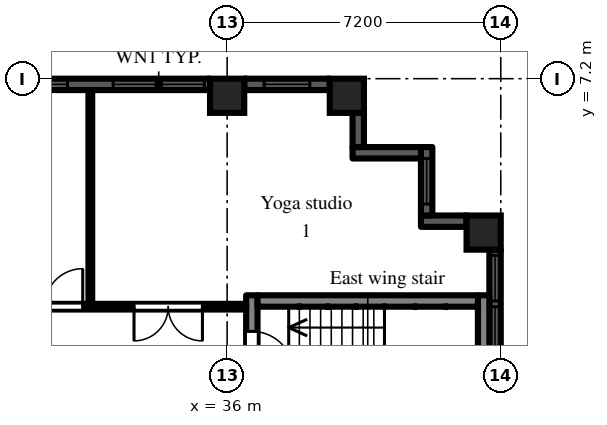
"""IFC4 building model, lengths in metres.
Left out: names, types, materials, properties, quantities, classifications, styles, units other than length and angle.
Written with IfcOpenShell. Run it as: python <this file> out.ifc"""

import sys

from ifc_helpers import new_model, si_unit, direction, frame, frame_2d, origin, origin_2d, place, context, subcontext, project, spatial, rectangle, extrude, element, fill, save


model = new_model("IFC4")
c1 = context("Model", 3, precision=1e-05, world=origin(), true_north=direction((0.0, 1.0)))
c2 = subcontext(c1, "Body", "Model", "MODEL_VIEW")
j1 = project(units=[si_unit("LENGTHUNIT", "METRE"), si_unit("PLANEANGLEUNIT", "RADIAN")], contexts=[c1])
p1 = place(None, origin())
s1 = spatial("IfcSite", under=j1, at=p1, CompositionType="ELEMENT")
p2 = place(p1, origin())
s2 = spatial("IfcBuilding", under=s1, at=p2, CompositionType="ELEMENT")
p3 = place(p2, frame((0.0, 0.0, 84.9)))
s3 = spatial("IfcBuildingStorey", under=s2, at=p3, CompositionType="ELEMENT", Elevation=84.9)
for number, where, z_axis, x_axis in (
    (1, (36.0, 6.75, 0.0), (0.0, 0.0, 1.0), (1.0, 0.0, 0.0)),
    (2, (39.15, 6.75, 0.0), (0.0, 0.0, 1.0), (1.0, 0.0, 0.0)),
    (3, (42.75, 3.15, 0.0), (0.0, 0.0, 1.0), (1.0, 0.0, 0.0)),
):
    element("IfcColumn", number, at=place(p3, frame(where, z_axis=z_axis, x_axis=x_axis)), inside=s3, PredefinedType="COLUMN", context=c2, shape_type="SweptSolid", body=[
        extrude(rectangle(XDim=0.9, YDim=0.9, at=origin_2d()), origin(), (0.0, 0.0, 1.0), 3.0),
    ])
p4 = place(p3, frame((43.05, -2.7, 0.0), z_axis=(0.0, 0.0, 1.0), x_axis=(0.0, 1.0, 0.0)))
e4 = element("IfcWall", 4, at=p4, inside=s3, PredefinedType="SOLIDWALL", context=c2, shape_type="SweptSolid", body=[
    extrude(rectangle(XDim=5.4, YDim=0.3, at=frame_2d((2.7, 0.0))), origin(), (0.0, 0.0, 1.0), 2.1),
])
p5 = place(p4, frame((1.5, 0.0, 0.2)))
e5 = element("IfcOpeningElement", 5, at=p5, cuts=e4, PredefinedType="OPENING", context=c2, shape_type="SweptSolid", body=[
    extrude(rectangle(XDim=2.4, YDim=1.85, at=frame_2d((1.2, 0.925))), frame((0.0, 0.16, 0.0), z_axis=(0.0, -1.0, 0.0), x_axis=(1.0, 0.0, 0.0)), (0.0, 0.0, 1.0), 0.32),
])
p6 = place(p4, frame((0.15, 0.0, 0.2)))
e6 = element("IfcOpeningElement", 6, at=p6, cuts=e4, PredefinedType="OPENING", context=c2, shape_type="SweptSolid", body=[
    extrude(rectangle(XDim=1.2, YDim=1.85, at=frame_2d((0.6, 0.925))), frame((0.0, 0.16, 0.0), z_axis=(0.0, -1.0, 0.0), x_axis=(1.0, 0.0, 0.0)), (0.0, 0.0, 1.0), 0.32),
])
p7 = place(p4, frame((4.05, 0.0, 0.2)))
e7 = element("IfcOpeningElement", 7, at=p7, cuts=e4, PredefinedType="OPENING", context=c2, shape_type="SweptSolid", body=[
    extrude(rectangle(XDim=1.2, YDim=1.85, at=frame_2d((0.6, 0.925))), frame((0.0, 0.16, 0.0), z_axis=(0.0, -1.0, 0.0), x_axis=(1.0, 0.0, 0.0)), (0.0, 0.0, 1.0), 0.32),
])
p8 = place(p3, frame((42.3, 3.45, 0.0), z_axis=(0.0, 0.0, 1.0), x_axis=(-1.0, 0.0, 0.0)))
e8 = element("IfcWall", 8, at=p8, inside=s3, PredefinedType="SOLIDWALL", context=c2, shape_type="SweptSolid", body=[
    extrude(rectangle(XDim=1.2, YDim=0.3, at=frame_2d((0.6, 0.0))), origin(), (0.0, 0.0, 1.0), 2.575),
])
p9 = place(p3, frame((41.25, 3.6, 0.0), z_axis=(0.0, 0.0, 1.0), x_axis=(0.0, 1.0, 0.0)))
e9 = element("IfcWall", 9, at=p9, inside=s3, PredefinedType="SOLIDWALL", context=c2, shape_type="SweptSolid", body=[
    extrude(rectangle(XDim=1.8, YDim=0.3, at=frame_2d((0.9, 0.0))), origin(), (0.0, 0.0, 1.0), 2.575),
])
p10 = place(p9, frame((0.3, 0.0, 0.2)))
e10 = element("IfcOpeningElement", 10, at=p10, cuts=e9, PredefinedType="OPENING", context=c2, shape_type="SweptSolid", body=[
    extrude(rectangle(XDim=1.2, YDim=1.85, at=frame_2d((0.6, 0.925))), frame((0.0, 0.16, 0.0), z_axis=(0.0, -1.0, 0.0), x_axis=(1.0, 0.0, 0.0)), (0.0, 0.0, 1.0), 0.32),
])
p11 = place(p3, frame((41.1, 5.25, 0.0), z_axis=(0.0, 0.0, 1.0), x_axis=(-1.0, 0.0, 0.0)))
e11 = element("IfcWall", 11, at=p11, inside=s3, PredefinedType="SOLIDWALL", context=c2, shape_type="SweptSolid", body=[
    extrude(rectangle(XDim=1.8, YDim=0.3, at=frame_2d((0.9, 0.0))), origin(), (0.0, 0.0, 1.0), 2.575),
])
p12 = place(p3, frame((39.45, 5.4, 0.0), z_axis=(0.0, 0.0, 1.0), x_axis=(0.0, 1.0, 0.0)))
e12 = element("IfcWall", 12, at=p12, inside=s3, PredefinedType="SOLIDWALL", context=c2, shape_type="SweptSolid", body=[
    extrude(rectangle(XDim=0.9, YDim=0.3, at=frame_2d((0.45, 0.0))), origin(), (0.0, 0.0, 1.0), 2.575),
])
p13 = place(p3, frame((38.7, 7.05, 0.0), z_axis=(0.0, 0.0, 1.0), x_axis=(-1.0, 0.0, 0.0)))
e13 = element("IfcWall", 13, at=p13, inside=s3, PredefinedType="SOLIDWALL", context=c2, shape_type="SweptSolid", body=[
    extrude(rectangle(XDim=2.25, YDim=0.3, at=frame_2d((1.125, 0.0))), origin(), (0.0, 0.0, 1.0), 2.1),
])
p14 = place(p13, frame((0.525, 0.0, 0.2)))
e14 = element("IfcOpeningElement", 14, at=p14, cuts=e13, PredefinedType="OPENING", context=c2, shape_type="SweptSolid", body=[
    extrude(rectangle(XDim=1.2, YDim=1.85, at=frame_2d((0.6, 0.925))), frame((0.0, 0.16, 0.0), z_axis=(0.0, -1.0, 0.0), x_axis=(1.0, 0.0, 0.0)), (0.0, 0.0, 1.0), 0.32),
])
p15 = place(p3, frame((35.55, 7.05, 0.0), z_axis=(0.0, 0.0, 1.0), x_axis=(-1.0, 0.0, 0.0)))
e15 = element("IfcWall", 15, at=p15, inside=s3, PredefinedType="SOLIDWALL", context=c2, shape_type="SweptSolid", body=[
    extrude(rectangle(XDim=6.3, YDim=0.3, at=frame_2d((3.15, 0.0))), origin(), (0.0, 0.0, 1.0), 2.1),
])
p16 = place(p15, frame((0.15, 0.0, 0.2)))
e16 = element("IfcOpeningElement", 16, at=p16, cuts=e15, PredefinedType="OPENING", context=c2, shape_type="SweptSolid", body=[
    extrude(rectangle(XDim=2.4, YDim=1.85, at=frame_2d((1.2, 0.925))), frame((0.0, 0.16, 0.0), z_axis=(0.0, -1.0, 0.0), x_axis=(1.0, 0.0, 0.0)), (0.0, 0.0, 1.0), 0.32),
])
p17 = place(p15, frame((3.75, 0.0, 0.2)))
e17 = element("IfcOpeningElement", 17, at=p17, cuts=e15, PredefinedType="OPENING", context=c2, shape_type="SweptSolid", body=[
    extrude(rectangle(XDim=2.4, YDim=1.85, at=frame_2d((1.2, 0.925))), frame((0.0, 0.16, 0.0), z_axis=(0.0, -1.0, 0.0), x_axis=(1.0, 0.0, 0.0)), (0.0, 0.0, 1.0), 0.32),
])
p18 = place(p3, frame((36.65, -1.5, 0.0), z_axis=(0.0, 0.0, 1.0), x_axis=(0.0, 1.0, 0.0)))
e18 = element("IfcWall", 18, at=p18, inside=s3, PredefinedType="SHEAR", context=c2, shape_type="SweptSolid", body=[
    extrude(rectangle(XDim=3.0, YDim=0.3, at=frame_2d((1.5, 0.0))), origin(), (0.0, 0.0, 1.0), 2.575),
])
p19 = place(p18, frame((0.95, 0.0, 0.0)))
e19 = element("IfcOpeningElement", 19, at=p19, cuts=e18, PredefinedType="OPENING", context=c2, shape_type="SweptSolid", body=[
    extrude(rectangle(XDim=1.1, YDim=2.1, at=frame_2d((0.55, 1.05))), frame((0.0, 0.16, 0.0), z_axis=(0.0, -1.0, 0.0), x_axis=(1.0, 0.0, 0.0)), (0.0, 0.0, 1.0), 0.32),
])
p20 = place(p3, frame((42.75, -1.5, 0.0), z_axis=(0.0, 0.0, 1.0), x_axis=(0.0, 1.0, 0.0)))
e20 = element("IfcWall", 20, at=p20, inside=s3, PredefinedType="SHEAR", context=c2, shape_type="SweptSolid", body=[
    extrude(rectangle(XDim=3.0, YDim=0.3, at=frame_2d((1.5, 0.0))), origin(), (0.0, 0.0, 1.0), 2.575),
])
p21 = place(p3, frame((36.8, 1.35, 0.0), z_axis=(0.0, 0.0, 1.0), x_axis=(1.0, 0.0, 0.0)))
e21 = element("IfcWall", 21, at=p21, inside=s3, PredefinedType="SHEAR", context=c2, shape_type="SweptSolid", body=[
    extrude(rectangle(XDim=5.8, YDim=0.3, at=frame_2d((2.9, 0.0))), origin(), (0.0, 0.0, 1.0), 2.575),
])
p22 = place(p3, frame((21.6, 1.2, 0.0), z_axis=(0.0, 0.0, 1.0), x_axis=(1.0, 0.0, 0.0)))
e22 = element("IfcWall", 22, at=p22, inside=s3, PredefinedType="PARTITIONING", context=c2, shape_type="SweptSolid", body=[
    extrude(rectangle(XDim=14.9, YDim=0.15, at=frame_2d((7.45, 0.0))), origin(), (0.0, 0.0, 1.0), 2.575),
])
p23 = place(p22, frame((6.0, 0.0, 0.0)))
e23 = element("IfcOpeningElement", 23, at=p23, cuts=e22, PredefinedType="OPENING", context=c2, shape_type="SweptSolid", body=[
    extrude(rectangle(XDim=1.0, YDim=2.1, at=frame_2d((0.5, 1.05))), frame((0.0, 0.085, 0.0), z_axis=(0.0, -1.0, 0.0), x_axis=(1.0, 0.0, 0.0)), (0.0, 0.0, 1.0), 0.17),
])
p24 = place(p22, frame((9.6, 0.0, 0.0)))
e24 = element("IfcOpeningElement", 24, at=p24, cuts=e22, PredefinedType="OPENING", context=c2, shape_type="SweptSolid", body=[
    extrude(rectangle(XDim=1.0, YDim=2.1, at=frame_2d((0.5, 1.05))), frame((0.0, 0.085, 0.0), z_axis=(0.0, -1.0, 0.0), x_axis=(1.0, 0.0, 0.0)), (0.0, 0.0, 1.0), 0.17),
])
p25 = place(p22, frame((11.95, 0.0, 0.0)))
e25 = element("IfcOpeningElement", 25, at=p25, cuts=e22, PredefinedType="OPENING", context=c2, shape_type="SweptSolid", body=[
    extrude(rectangle(XDim=1.8, YDim=2.1, at=frame_2d((0.9, 1.05))), frame((0.0, 0.085, 0.0), z_axis=(0.0, -1.0, 0.0), x_axis=(1.0, 0.0, 0.0)), (0.0, 0.0, 1.0), 0.17),
])
p26 = place(p3, frame((32.4, 1.275, 0.0), z_axis=(0.0, 0.0, 1.0), x_axis=(0.0, 1.0, 0.0)))
e26 = element("IfcWall", 26, at=p26, inside=s3, PredefinedType="PARTITIONING", context=c2, shape_type="SweptSolid", body=[
    extrude(rectangle(XDim=5.625, YDim=0.1, at=frame_2d((2.812, 0.0))), origin(), (0.0, 0.0, 1.0), 2.575),
])
p27 = place(p5, origin())
e27 = element("IfcWindow", 27, at=p27, inside=s3, PartitioningType="SINGLE_PANEL", PredefinedType="WINDOW", context=c2, shape_type="SweptSolid", body=[
    extrude(rectangle(XDim=2.4, YDim=1.85, at=frame_2d((1.2, 0.925))), frame((0.0, 0.03, 0.0), z_axis=(0.0, -1.0, 0.0), x_axis=(1.0, 0.0, 0.0)), (0.0, 0.0, 1.0), 0.06),
])
fill(e5, e27)
p28 = place(p7, origin())
e28 = element("IfcWindow", 28, at=p28, inside=s3, PartitioningType="SINGLE_PANEL", PredefinedType="WINDOW", context=c2, shape_type="SweptSolid", body=[
    extrude(rectangle(XDim=1.2, YDim=1.85, at=frame_2d((0.6, 0.925))), frame((0.0, 0.03, 0.0), z_axis=(0.0, -1.0, 0.0), x_axis=(1.0, 0.0, 0.0)), (0.0, 0.0, 1.0), 0.06),
])
fill(e7, e28)
p29 = place(p10, origin())
e29 = element("IfcWindow", 29, at=p29, inside=s3, PartitioningType="SINGLE_PANEL", PredefinedType="WINDOW", context=c2, shape_type="SweptSolid", body=[
    extrude(rectangle(XDim=1.2, YDim=1.85, at=frame_2d((0.6, 0.925))), frame((0.0, 0.03, 0.0), z_axis=(0.0, -1.0, 0.0), x_axis=(1.0, 0.0, 0.0)), (0.0, 0.0, 1.0), 0.06),
])
fill(e10, e29)
p30 = place(p14, origin())
e30 = element("IfcWindow", 30, at=p30, inside=s3, PartitioningType="SINGLE_PANEL", PredefinedType="WINDOW", context=c2, shape_type="SweptSolid", body=[
    extrude(rectangle(XDim=1.2, YDim=1.85, at=frame_2d((0.6, 0.925))), frame((0.0, 0.03, 0.0), z_axis=(0.0, -1.0, 0.0), x_axis=(1.0, 0.0, 0.0)), (0.0, 0.0, 1.0), 0.06),
])
fill(e14, e30)
p31 = place(p16, origin())
e31 = element("IfcWindow", 31, at=p31, inside=s3, PartitioningType="SINGLE_PANEL", PredefinedType="WINDOW", context=c2, shape_type="SweptSolid", body=[
    extrude(rectangle(XDim=2.4, YDim=1.85, at=frame_2d((1.2, 0.925))), frame((0.0, 0.03, 0.0), z_axis=(0.0, -1.0, 0.0), x_axis=(1.0, 0.0, 0.0)), (0.0, 0.0, 1.0), 0.06),
])
fill(e16, e31)
p32 = place(p17, origin())
e32 = element("IfcWindow", 32, at=p32, inside=s3, PartitioningType="SINGLE_PANEL", PredefinedType="WINDOW", context=c2, shape_type="SweptSolid", body=[
    extrude(rectangle(XDim=2.4, YDim=1.85, at=frame_2d((1.2, 0.925))), frame((0.0, 0.03, 0.0), z_axis=(0.0, -1.0, 0.0), x_axis=(1.0, 0.0, 0.0)), (0.0, 0.0, 1.0), 0.06),
])
fill(e17, e32)
p33 = place(p19, frame((1.1, 0.0, 0.0), z_axis=(0.0, 0.0, 1.0), x_axis=(-1.0, 0.0, 0.0)))
e33 = element("IfcDoor", 33, at=p33, inside=s3, OperationType="SINGLE_SWING_RIGHT", PredefinedType="DOOR", context=c2, shape_type="SweptSolid", body=[
    extrude(rectangle(XDim=1.1, YDim=2.1, at=frame_2d((0.55, 1.05))), frame((0.0, 0.025, 0.0), z_axis=(0.0, -1.0, 0.0), x_axis=(1.0, 0.0, 0.0)), (0.0, 0.0, 1.0), 0.05),
])
fill(e19, e33)
p34 = place(p24, origin())
e34 = element("IfcDoor", 34, at=p34, inside=s3, OperationType="SINGLE_SWING_RIGHT", PredefinedType="DOOR", context=c2, shape_type="SweptSolid", body=[
    extrude(rectangle(XDim=1.0, YDim=2.1, at=frame_2d((0.5, 1.05))), frame((0.0, 0.025, 0.0), z_axis=(0.0, -1.0, 0.0), x_axis=(1.0, 0.0, 0.0)), (0.0, 0.0, 1.0), 0.05),
])
fill(e24, e34)
p35 = place(p25, frame((1.8, 0.0, 0.0), z_axis=(0.0, 0.0, 1.0), x_axis=(-1.0, 0.0, 0.0)))
e35 = element("IfcDoor", 35, at=p35, inside=s3, OperationType="DOUBLE_DOOR_DOUBLE_SWING", PredefinedType="DOOR", context=c2, shape_type="SweptSolid", body=[
    extrude(rectangle(XDim=1.8, YDim=2.1, at=frame_2d((0.9, 1.05))), frame((0.0, 0.025, 0.0), z_axis=(0.0, -1.0, 0.0), x_axis=(1.0, 0.0, 0.0)), (0.0, 0.0, 1.0), 0.05),
])
fill(e25, e35)
save(model, sys.argv[1])
